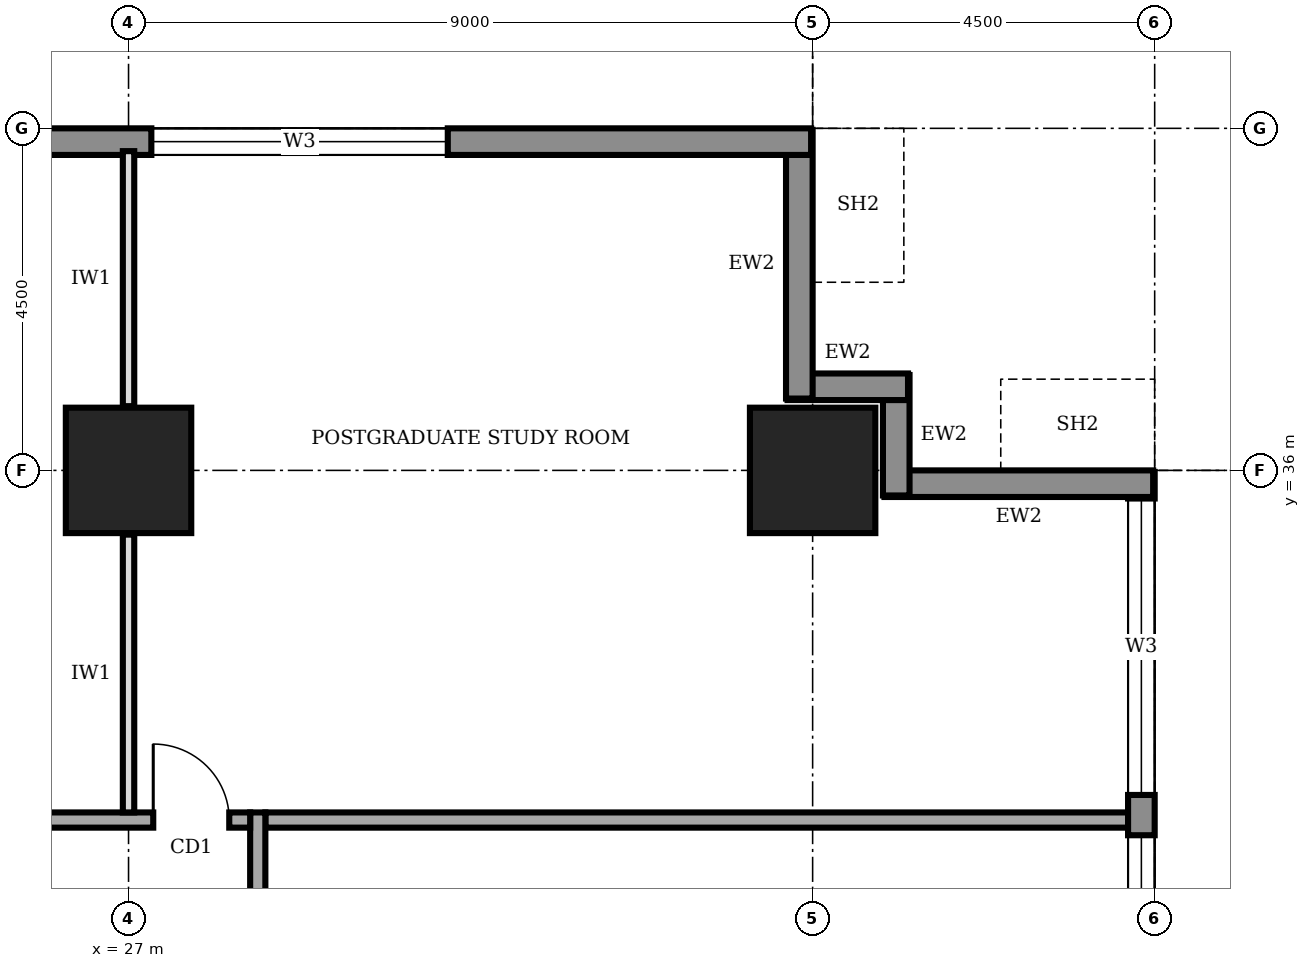
"""IFC4 building model, lengths in metres.
Left out: names, types, materials, properties, quantities, classifications, styles, units other than length and angle.
Written with IfcOpenShell. Run it as: python <this file> out.ifc"""

import sys

from ifc_helpers import new_model, si_unit, direction, frame, frame_2d, origin, origin_2d, place, context, subcontext, project, spatial, rectangle, extrude, element, fill, save


model = new_model("IFC4")
c1 = context("Model", 3, precision=1e-05, world=origin(), true_north=direction((0.0, 1.0)))
c2 = subcontext(c1, "Body", "Model", "MODEL_VIEW")
j1 = project(units=[si_unit("LENGTHUNIT", "METRE"), si_unit("PLANEANGLEUNIT", "RADIAN")], contexts=[c1])
p1 = place(None, origin())
s1 = spatial("IfcSite", under=j1, at=p1, CompositionType="ELEMENT")
p2 = place(p1, origin())
s2 = spatial("IfcBuilding", under=s1, at=p2, CompositionType="ELEMENT")
p3 = place(p2, frame((0.0, 0.0, 177.0)))
s3 = spatial("IfcBuildingStorey", under=s2, at=p3, CompositionType="ELEMENT", Elevation=177.0)
for number, where, z_axis, x_axis in (
    (1, (27.0, 36.0, 0.0), (0.0, 0.0, 1.0), (1.0, 0.0, 0.0)),
    (2, (36.0, 36.0, 0.0), (0.0, 0.0, 1.0), (1.0, 0.0, 0.0)),
):
    element("IfcColumn", number, at=place(p3, frame(where, z_axis=z_axis, x_axis=x_axis)), inside=s3, PredefinedType="COLUMN", context=c2, shape_type="SweptSolid", body=[
        extrude(rectangle(XDim=1.65, YDim=1.65, at=origin_2d()), origin(), (0.0, 0.0, 1.0), 4.0),
    ])
p4 = place(p3, frame((40.325, 4.52, 0.0), z_axis=(0.0, 0.0, 1.0), x_axis=(0.0, 1.0, 0.0)))
e3 = element("IfcWall", 3, at=p4, inside=s3, PredefinedType="STANDARD", context=c2, shape_type="SweptSolid", body=[
    extrude(rectangle(XDim=31.46, YDim=0.35, at=frame_2d((15.73, 0.0))), origin(), (0.0, 0.0, 1.0), 3.75),
])
p5 = place(p4, frame((4.78, 0.0, 0.95)))
e4 = element("IfcOpeningElement", 4, at=p5, cuts=e3, PredefinedType="OPENING", context=c2, shape_type="SweptSolid", body=[
    extrude(rectangle(XDim=3.9, YDim=1.8, at=frame_2d((1.95, 0.9))), frame((0.0, 0.185, 0.0), z_axis=(0.0, -1.0, 0.0), x_axis=(1.0, 0.0, 0.0)), (0.0, 0.0, 1.0), 0.37),
])
p6 = place(p4, frame((9.28, 0.0, 0.95)))
e5 = element("IfcOpeningElement", 5, at=p6, cuts=e3, PredefinedType="OPENING", context=c2, shape_type="SweptSolid", body=[
    extrude(rectangle(XDim=3.9, YDim=1.8, at=frame_2d((1.95, 0.9))), frame((0.0, 0.185, 0.0), z_axis=(0.0, -1.0, 0.0), x_axis=(1.0, 0.0, 0.0)), (0.0, 0.0, 1.0), 0.37),
])
p7 = place(p4, frame((13.78, 0.0, 0.95)))
e6 = element("IfcOpeningElement", 6, at=p7, cuts=e3, PredefinedType="OPENING", context=c2, shape_type="SweptSolid", body=[
    extrude(rectangle(XDim=3.9, YDim=1.8, at=frame_2d((1.95, 0.9))), frame((0.0, 0.185, 0.0), z_axis=(0.0, -1.0, 0.0), x_axis=(1.0, 0.0, 0.0)), (0.0, 0.0, 1.0), 0.37),
])
p8 = place(p4, frame((18.28, 0.0, 0.95)))
e7 = element("IfcOpeningElement", 7, at=p8, cuts=e3, PredefinedType="OPENING", context=c2, shape_type="SweptSolid", body=[
    extrude(rectangle(XDim=3.9, YDim=1.8, at=frame_2d((1.95, 0.9))), frame((0.0, 0.185, 0.0), z_axis=(0.0, -1.0, 0.0), x_axis=(1.0, 0.0, 0.0)), (0.0, 0.0, 1.0), 0.37),
])
p9 = place(p4, frame((22.78, 0.0, 0.95)))
e8 = element("IfcOpeningElement", 8, at=p9, cuts=e3, PredefinedType="OPENING", context=c2, shape_type="SweptSolid", body=[
    extrude(rectangle(XDim=3.9, YDim=1.8, at=frame_2d((1.95, 0.9))), frame((0.0, 0.185, 0.0), z_axis=(0.0, -1.0, 0.0), x_axis=(1.0, 0.0, 0.0)), (0.0, 0.0, 1.0), 0.37),
])
p10 = place(p4, frame((27.21, 0.0, 0.95)))
e9 = element("IfcOpeningElement", 9, at=p10, cuts=e3, PredefinedType="OPENING", context=c2, shape_type="SweptSolid", body=[
    extrude(rectangle(XDim=3.9, YDim=1.8, at=frame_2d((1.95, 0.9))), frame((0.0, 0.185, 0.0), z_axis=(0.0, -1.0, 0.0), x_axis=(1.0, 0.0, 0.0)), (0.0, 0.0, 1.0), 0.37),
])
p11 = place(p3, frame((40.48, 35.825, 0.0), z_axis=(0.0, 0.0, 1.0), x_axis=(-1.0, 0.0, 0.0)))
e10 = element("IfcWall", 10, at=p11, inside=s3, PredefinedType="STANDARD", context=c2, shape_type="SweptSolid", body=[
    extrude(rectangle(XDim=3.535, YDim=0.35, at=frame_2d((1.768, 0.0))), origin(), (0.0, 0.0, 1.0), 2.85),
])
for number, where, z_axis, x_axis in (
    (11, (37.1, 35.67, 0.0), (0.0, 0.0, 1.0), (0.0, 1.0, 0.0)),
    (12, (37.255, 37.1, 0.0), (0.0, 0.0, 1.0), (-1.0, 0.0, 0.0)),
):
    element("IfcWall", number, at=place(p3, frame(where, z_axis=z_axis, x_axis=x_axis)), inside=s3, PredefinedType="STANDARD", context=c2, shape_type="SweptSolid", body=[
        extrude(rectangle(XDim=1.585, YDim=0.35, at=frame_2d((0.792, 0.0))), origin(), (0.0, 0.0, 1.0), 3.75),
    ])
p12 = place(p3, frame((35.825, 36.945, 0.0), z_axis=(0.0, 0.0, 1.0), x_axis=(0.0, 1.0, 0.0)))
e13 = element("IfcWall", 13, at=p12, inside=s3, PredefinedType="STANDARD", context=c2, shape_type="SweptSolid", body=[
    extrude(rectangle(XDim=3.535, YDim=0.35, at=frame_2d((1.768, 0.0))), origin(), (0.0, 0.0, 1.0), 2.85),
])
p13 = place(p3, frame((35.98, 40.325, 0.0), z_axis=(0.0, 0.0, 1.0), x_axis=(-1.0, 0.0, 0.0)))
e14 = element("IfcWall", 14, at=p13, inside=s3, PredefinedType="STANDARD", context=c2, shape_type="SweptSolid", body=[
    extrude(rectangle(XDim=31.46, YDim=0.35, at=frame_2d((15.73, 0.0))), origin(), (0.0, 0.0, 1.0), 3.75),
])
p14 = place(p13, frame((27.21, 0.0, 0.95)))
e15 = element("IfcOpeningElement", 15, at=p14, cuts=e14, PredefinedType="OPENING", context=c2, shape_type="SweptSolid", body=[
    extrude(rectangle(XDim=3.9, YDim=1.8, at=frame_2d((1.95, 0.9))), frame((0.0, 0.185, 0.0), z_axis=(0.0, -1.0, 0.0), x_axis=(1.0, 0.0, 0.0)), (0.0, 0.0, 1.0), 0.37),
])
p15 = place(p13, frame((22.78, 0.0, 0.95)))
e16 = element("IfcOpeningElement", 16, at=p15, cuts=e14, PredefinedType="OPENING", context=c2, shape_type="SweptSolid", body=[
    extrude(rectangle(XDim=3.9, YDim=1.8, at=frame_2d((1.95, 0.9))), frame((0.0, 0.185, 0.0), z_axis=(0.0, -1.0, 0.0), x_axis=(1.0, 0.0, 0.0)), (0.0, 0.0, 1.0), 0.37),
])
p16 = place(p13, frame((4.78, 0.0, 0.95)))
e17 = element("IfcOpeningElement", 17, at=p16, cuts=e14, PredefinedType="OPENING", context=c2, shape_type="SweptSolid", body=[
    extrude(rectangle(XDim=3.9, YDim=1.8, at=frame_2d((1.95, 0.9))), frame((0.0, 0.185, 0.0), z_axis=(0.0, -1.0, 0.0), x_axis=(1.0, 0.0, 0.0)), (0.0, 0.0, 1.0), 0.37),
])
p17 = place(p3, frame((28.7, 9.2, 0.0), z_axis=(0.0, 0.0, 1.0), x_axis=(0.0, 1.0, 0.0)))
e18 = element("IfcWall", 18, at=p17, inside=s3, PredefinedType="SOLIDWALL", context=c2, shape_type="SweptSolid", body=[
    extrude(rectangle(XDim=22.3, YDim=0.2, at=frame_2d((11.15, 0.0))), origin(), (0.0, 0.0, 1.0), 3.75),
])
p18 = place(p17, frame((1.55, 0.0, 0.0)))
e19 = element("IfcOpeningElement", 19, at=p18, cuts=e18, PredefinedType="OPENING", context=c2, shape_type="SweptSolid", body=[
    extrude(rectangle(XDim=1.0, YDim=2.1, at=frame_2d((0.5, 1.05))), frame((0.0, 0.11, 0.0), z_axis=(0.0, -1.0, 0.0), x_axis=(1.0, 0.0, 0.0)), (0.0, 0.0, 1.0), 0.22),
])
p19 = place(p17, frame((6.05, 0.0, 0.0)))
e20 = element("IfcOpeningElement", 20, at=p19, cuts=e18, PredefinedType="OPENING", context=c2, shape_type="SweptSolid", body=[
    extrude(rectangle(XDim=1.0, YDim=2.1, at=frame_2d((0.5, 1.05))), frame((0.0, 0.11, 0.0), z_axis=(0.0, -1.0, 0.0), x_axis=(1.0, 0.0, 0.0)), (0.0, 0.0, 1.0), 0.22),
])
p20 = place(p17, frame((10.55, 0.0, 0.0)))
e21 = element("IfcOpeningElement", 21, at=p20, cuts=e18, PredefinedType="OPENING", context=c2, shape_type="SweptSolid", body=[
    extrude(rectangle(XDim=1.0, YDim=2.1, at=frame_2d((0.5, 1.05))), frame((0.0, 0.11, 0.0), z_axis=(0.0, -1.0, 0.0), x_axis=(1.0, 0.0, 0.0)), (0.0, 0.0, 1.0), 0.22),
])
p21 = place(p17, frame((15.05, 0.0, 0.0)))
e22 = element("IfcOpeningElement", 22, at=p21, cuts=e18, PredefinedType="OPENING", context=c2, shape_type="SweptSolid", body=[
    extrude(rectangle(XDim=1.0, YDim=2.1, at=frame_2d((0.5, 1.05))), frame((0.0, 0.11, 0.0), z_axis=(0.0, -1.0, 0.0), x_axis=(1.0, 0.0, 0.0)), (0.0, 0.0, 1.0), 0.22),
])
p22 = place(p17, frame((19.55, 0.0, 0.0)))
e23 = element("IfcOpeningElement", 23, at=p22, cuts=e18, PredefinedType="OPENING", context=c2, shape_type="SweptSolid", body=[
    extrude(rectangle(XDim=1.0, YDim=2.1, at=frame_2d((0.5, 1.05))), frame((0.0, 0.11, 0.0), z_axis=(0.0, -1.0, 0.0), x_axis=(1.0, 0.0, 0.0)), (0.0, 0.0, 1.0), 0.22),
])
p23 = place(p3, frame((28.6, 31.4, 0.0), z_axis=(0.0, 0.0, 1.0), x_axis=(-1.0, 0.0, 0.0)))
e24 = element("IfcWall", 24, at=p23, inside=s3, PredefinedType="SOLIDWALL", context=c2, shape_type="SweptSolid", body=[
    extrude(rectangle(XDim=16.9, YDim=0.2, at=frame_2d((8.45, 0.0))), origin(), (0.0, 0.0, 1.0), 3.75),
])
p24 = place(p23, frame((15.425, 0.0, 0.0)))
e25 = element("IfcOpeningElement", 25, at=p24, cuts=e24, PredefinedType="OPENING", context=c2, shape_type="SweptSolid", body=[
    extrude(rectangle(XDim=1.0, YDim=2.1, at=frame_2d((0.5, 1.05))), frame((0.0, 0.11, 0.0), z_axis=(0.0, -1.0, 0.0), x_axis=(1.0, 0.0, 0.0)), (0.0, 0.0, 1.0), 0.22),
])
p25 = place(p23, frame((12.35, 0.0, 0.0)))
e26 = element("IfcOpeningElement", 26, at=p25, cuts=e24, PredefinedType="OPENING", context=c2, shape_type="SweptSolid", body=[
    extrude(rectangle(XDim=1.0, YDim=2.1, at=frame_2d((0.5, 1.05))), frame((0.0, 0.11, 0.0), z_axis=(0.0, -1.0, 0.0), x_axis=(1.0, 0.0, 0.0)), (0.0, 0.0, 1.0), 0.22),
])
p26 = place(p23, frame((5.6, 0.0, 0.0)))
e27 = element("IfcOpeningElement", 27, at=p26, cuts=e24, PredefinedType="OPENING", context=c2, shape_type="SweptSolid", body=[
    extrude(rectangle(XDim=1.0, YDim=2.1, at=frame_2d((0.5, 1.05))), frame((0.0, 0.11, 0.0), z_axis=(0.0, -1.0, 0.0), x_axis=(1.0, 0.0, 0.0)), (0.0, 0.0, 1.0), 0.22),
])
p27 = place(p23, frame((0.275, 0.0, 0.0)))
e28 = element("IfcOpeningElement", 28, at=p27, cuts=e24, PredefinedType="OPENING", context=c2, shape_type="SweptSolid", body=[
    extrude(rectangle(XDim=1.0, YDim=2.1, at=frame_2d((0.5, 1.05))), frame((0.0, 0.11, 0.0), z_axis=(0.0, -1.0, 0.0), x_axis=(1.0, 0.0, 0.0)), (0.0, 0.0, 1.0), 0.22),
])
p28 = place(p3, frame((28.8, 31.4, 0.0), z_axis=(0.0, 0.0, 1.0), x_axis=(1.0, 0.0, 0.0)))
e29 = element("IfcWall", 29, at=p28, inside=s3, PredefinedType="SOLIDWALL", context=c2, shape_type="SweptSolid", body=[
    extrude(rectangle(XDim=11.4, YDim=0.2, at=frame_2d((5.7, 0.0))), origin(), (0.0, 0.0, 1.0), 3.75),
])
p29 = place(p3, frame((27.0, 31.5, 0.0), z_axis=(0.0, 0.0, 1.0), x_axis=(0.0, 1.0, 0.0)))
e30 = element("IfcWall", 30, at=p29, inside=s3, PredefinedType="PARTITIONING", context=c2, shape_type="SweptSolid", body=[
    extrude(rectangle(XDim=3.655, YDim=0.15, at=frame_2d((1.828, 0.0))), origin(), (0.0, 0.0, 1.0), 2.85),
])
p30 = place(p3, frame((27.0, 36.845, 0.0), z_axis=(0.0, 0.0, 1.0), x_axis=(0.0, 1.0, 0.0)))
e31 = element("IfcWall", 31, at=p30, inside=s3, PredefinedType="PARTITIONING", context=c2, shape_type="SweptSolid", body=[
    extrude(rectangle(XDim=3.355, YDim=0.15, at=frame_2d((1.677, 0.0))), origin(), (0.0, 0.0, 1.0), 2.85),
])
p31 = place(p9, origin())
e32 = element("IfcWindow", 32, at=p31, inside=s3, PartitioningType="SINGLE_PANEL", PredefinedType="WINDOW", context=c2, shape_type="SweptSolid", body=[
    extrude(rectangle(XDim=3.9, YDim=1.8, at=frame_2d((1.95, 0.9))), frame((0.0, 0.03, 0.0), z_axis=(0.0, -1.0, 0.0), x_axis=(1.0, 0.0, 0.0)), (0.0, 0.0, 1.0), 0.06),
])
fill(e8, e32)
p32 = place(p10, origin())
e33 = element("IfcWindow", 33, at=p32, inside=s3, PartitioningType="SINGLE_PANEL", PredefinedType="WINDOW", context=c2, shape_type="SweptSolid", body=[
    extrude(rectangle(XDim=3.9, YDim=1.8, at=frame_2d((1.95, 0.9))), frame((0.0, 0.03, 0.0), z_axis=(0.0, -1.0, 0.0), x_axis=(1.0, 0.0, 0.0)), (0.0, 0.0, 1.0), 0.06),
])
fill(e9, e33)
p33 = place(p16, origin())
e34 = element("IfcWindow", 34, at=p33, inside=s3, PartitioningType="SINGLE_PANEL", PredefinedType="WINDOW", context=c2, shape_type="SweptSolid", body=[
    extrude(rectangle(XDim=3.9, YDim=1.8, at=frame_2d((1.95, 0.9))), frame((0.0, 0.03, 0.0), z_axis=(0.0, -1.0, 0.0), x_axis=(1.0, 0.0, 0.0)), (0.0, 0.0, 1.0), 0.06),
])
fill(e17, e34)
p34 = place(p27, frame((1.0, 0.0, 0.0), z_axis=(0.0, 0.0, 1.0), x_axis=(-1.0, 0.0, 0.0)))
e35 = element("IfcDoor", 35, at=p34, inside=s3, OperationType="SINGLE_SWING_LEFT", PredefinedType="DOOR", context=c2, shape_type="SweptSolid", body=[
    extrude(rectangle(XDim=1.0, YDim=2.1, at=frame_2d((0.5, 1.05))), frame((0.0, 0.025, 0.0), z_axis=(0.0, -1.0, 0.0), x_axis=(1.0, 0.0, 0.0)), (0.0, 0.0, 1.0), 0.05),
])
fill(e28, e35)
save(model, sys.argv[1])
